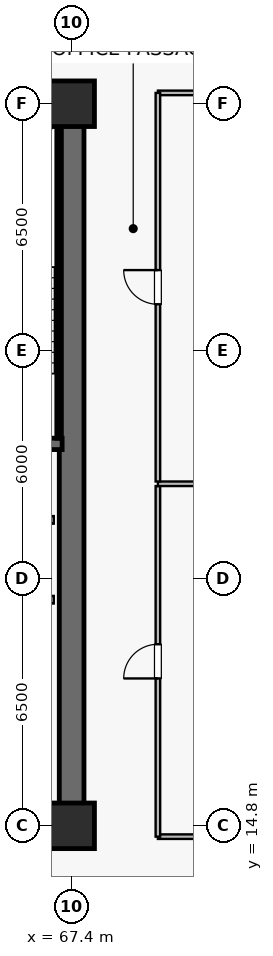
"""IFC4 building model, lengths in metres.
Left out: names, types, materials, properties, quantities, classifications, styles, units other than length and angle.
Written with IfcOpenShell. Run it as: python <this file> out.ifc"""

import sys

from ifc_helpers import new_model, si_unit, direction, frame, frame_2d, origin, origin_2d, place, context, subcontext, project, spatial, rectangle, extrude, source, transform, mapped, element, fill, save


model = new_model("IFC4")
c1 = context("Model", 3, precision=1e-05, world=origin(), true_north=direction((0.0, 1.0)))
c2 = subcontext(c1, "Body", "Model", "MODEL_VIEW")
j1 = project(units=[si_unit("LENGTHUNIT", "METRE"), si_unit("PLANEANGLEUNIT", "RADIAN")], contexts=[c1])
p1 = place(None, origin())
s1 = spatial("IfcSite", under=j1, at=p1, CompositionType="ELEMENT")
p2 = place(p1, origin())
s2 = spatial("IfcBuilding", under=s1, at=p2, CompositionType="ELEMENT")
p3 = place(p2, frame((0.0, 0.0, 133.8)))
s3 = spatial("IfcBuildingStorey", under=s2, at=p3, CompositionType="ELEMENT", Elevation=133.8)
p4 = place(p3, frame((52.275, 14.8, 0.0), z_axis=(0.0, 0.0, 1.0), x_axis=(1.0, 0.0, 0.0)))
e1 = element("IfcWall", 1, at=p4, inside=s3, PredefinedType="SHEAR", context=c2, shape_type="SweptSolid", body=[
    extrude(rectangle(XDim=15.45, YDim=0.65, at=frame_2d((7.725, 0.0))), origin(), (0.0, 0.0, 1.0), 3.79),
])
p5 = place(p3, frame((52.275, 33.8, 0.0), z_axis=(0.0, 0.0, 1.0), x_axis=(1.0, 0.0, 0.0)))
e2 = element("IfcWall", 2, at=p5, inside=s3, PredefinedType="SHEAR", context=c2, shape_type="SweptSolid", body=[
    extrude(rectangle(XDim=15.45, YDim=0.65, at=frame_2d((7.725, 0.0))), origin(), (0.0, 0.0, 1.0), 3.79),
])
p6 = place(p5, frame((8.825, 0.0, 0.0)))
e3 = element("IfcOpeningElement", 3, at=p6, cuts=e2, PredefinedType="OPENING", context=c2, shape_type="SweptSolid", body=[
    extrude(rectangle(XDim=0.95, YDim=2.15, at=frame_2d((0.475, 1.075))), frame((0.0, 0.335, 0.0), z_axis=(0.0, -1.0, 0.0), x_axis=(1.0, 0.0, 0.0)), (0.0, 0.0, 1.0), 0.67),
])
p7 = place(p5, frame((5.46, 0.0, 0.0)))
e4 = element("IfcOpeningElement", 4, at=p7, cuts=e2, PredefinedType="OPENING", context=c2, shape_type="SweptSolid", body=[
    extrude(rectangle(XDim=0.95, YDim=2.15, at=frame_2d((0.475, 1.075))), frame((0.0, 0.335, 0.0), z_axis=(0.0, -1.0, 0.0), x_axis=(1.0, 0.0, 0.0)), (0.0, 0.0, 1.0), 0.67),
])
p8 = place(p5, frame((2.06, 0.0, 0.0)))
e5 = element("IfcOpeningElement", 5, at=p8, cuts=e2, PredefinedType="OPENING", context=c2, shape_type="SweptSolid", body=[
    extrude(rectangle(XDim=0.95, YDim=2.15, at=frame_2d((0.475, 1.075))), frame((0.0, 0.335, 0.0), z_axis=(0.0, -1.0, 0.0), x_axis=(1.0, 0.0, 0.0)), (0.0, 0.0, 1.0), 0.67),
])
p9 = place(p3, frame((67.4, 15.125, 0.0), z_axis=(0.0, 0.0, 1.0), x_axis=(0.0, 1.0, 0.0)))
e6 = element("IfcWall", 6, at=p9, inside=s3, PredefinedType="SHEAR", context=c2, shape_type="SweptSolid", body=[
    extrude(rectangle(XDim=18.35, YDim=0.65, at=frame_2d((9.175, 0.0))), origin(), (0.0, 0.0, 1.0), 3.79),
])
p10 = place(p3, frame((63.35, 24.85, 0.0), z_axis=(0.0, 0.0, 1.0), x_axis=(1.0, 0.0, 0.0)))
e7 = element("IfcWall", 7, at=p10, inside=s3, PredefinedType="SHEAR", context=c2, shape_type="SweptSolid", body=[
    extrude(rectangle(XDim=3.8, YDim=0.3, at=frame_2d((1.9, 0.0))), origin(), (0.0, 0.0, 1.0), 3.79),
])
p11 = place(p3, frame((63.35, 33.4, 0.0), z_axis=(0.0, 0.0, 1.0), x_axis=(1.0, 0.0, 0.0)))
e8 = element("IfcWall", 8, at=p11, inside=s3, PredefinedType="SOLIDWALL", context=c2, shape_type="SweptSolid", body=[
    extrude(rectangle(XDim=3.72, YDim=0.12, at=frame_2d((1.86, 0.0))), origin(), (0.0, 0.0, 1.0), 3.79),
])
p12 = place(p3, frame((67.07, 25.0, 0.0), z_axis=(0.0, 0.0, 1.0), x_axis=(0.0, 1.0, 0.0)))
e9 = element("IfcWall", 9, at=p12, inside=s3, PredefinedType="SOLIDWALL", context=c2, shape_type="SweptSolid", body=[
    extrude(rectangle(XDim=8.32, YDim=0.12, at=frame_2d((4.16, 0.0))), origin(), (0.0, 0.0, 1.0), 3.79),
])
m1 = source(origin(), c2, "Body", "SweptSolid", [
    extrude(rectangle(XDim=1.2, YDim=1.2, at=origin_2d()), origin(), (0.0, 0.0, 1.0), 4.1),
])
for number, where, z_axis, x_axis in (
    (10, (67.4, 14.8, 0.0), (0.0, 0.0, 1.0), (1.0, 0.0, 0.0)),
    (11, (67.4, 33.8, 0.0), (0.0, 0.0, 1.0), (1.0, 0.0, 0.0)),
):
    element("IfcColumn", number, at=place(p3, frame(where, z_axis=z_axis, x_axis=x_axis)), inside=s3, PredefinedType="COLUMN", context=c2, shape_type="MappedRepresentation", body=[
        mapped(m1, transform((0.0, 0.0, 0.0), scale=1.0)),
    ])
for number, where, z_axis, x_axis in (
    (12, (64.67, 20.75, 0.0), (0.0, 0.0, 1.0), (1.0, 0.0, 0.0)),
    (13, (64.67, 22.85, 0.0), (0.0, 0.0, 1.0), (1.0, 0.0, 0.0)),
):
    element("IfcWall", number, at=place(p3, frame(where, z_axis=z_axis, x_axis=x_axis)), inside=s3, PredefinedType="SOLIDWALL", context=c2, shape_type="SweptSolid", body=[
        extrude(rectangle(XDim=2.26, YDim=0.2, at=frame_2d((1.13, 0.0))), origin(), (0.0, 0.0, 1.0), 3.79),
    ])
for number, where, z_axis, x_axis in (
    (14, (69.67, 14.515, 0.0), (0.0, 0.0, 1.0), (1.0, 0.0, 0.0)),
    (15, (69.67, 34.085, 0.0), (0.0, 0.0, 1.0), (1.0, 0.0, 0.0)),
):
    element("IfcWall", number, at=place(p3, frame(where, z_axis=z_axis, x_axis=x_axis)), inside=s3, PredefinedType="PARTITIONING", context=c2, shape_type="SweptSolid", body=[
        extrude(rectangle(XDim=3.02, YDim=0.12, at=frame_2d((1.51, 0.0))), origin(), (0.0, 0.0, 1.0), 3.79),
    ])
p13 = place(p3, frame((69.67, 14.515, 0.0), z_axis=(0.0, 0.0, 1.0), x_axis=(0.0, 1.0, 0.0)))
e16 = element("IfcWall", 16, at=p13, inside=s3, PredefinedType="PARTITIONING", context=c2, shape_type="SweptSolid", body=[
    extrude(rectangle(XDim=9.225, YDim=0.12, at=frame_2d((4.613, 0.0))), origin(), (0.0, 0.0, 1.0), 3.79),
])
p14 = place(p13, frame((4.163, 0.0, 0.0)))
e17 = element("IfcOpeningElement", 17, at=p14, cuts=e16, PredefinedType="OPENING", context=c2, shape_type="SweptSolid", body=[
    extrude(rectangle(XDim=0.9, YDim=2.1, at=frame_2d((0.45, 1.05))), frame((0.0, 0.07, 0.0), z_axis=(0.0, -1.0, 0.0), x_axis=(1.0, 0.0, 0.0)), (0.0, 0.0, 1.0), 0.14),
])
p15 = place(p3, frame((69.67, 23.8, 0.0), z_axis=(0.0, 0.0, 1.0), x_axis=(1.0, 0.0, 0.0)))
e18 = element("IfcWall", 18, at=p15, inside=s3, PredefinedType="PARTITIONING", context=c2, shape_type="SweptSolid", body=[
    extrude(rectangle(XDim=3.02, YDim=0.12, at=frame_2d((1.51, 0.0))), origin(), (0.0, 0.0, 1.0), 3.79),
])
p16 = place(p3, frame((69.67, 23.86, 0.0), z_axis=(0.0, 0.0, 1.0), x_axis=(0.0, 1.0, 0.0)))
e19 = element("IfcWall", 19, at=p16, inside=s3, PredefinedType="PARTITIONING", context=c2, shape_type="SweptSolid", body=[
    extrude(rectangle(XDim=10.225, YDim=0.12, at=frame_2d((5.112, 0.0))), origin(), (0.0, 0.0, 1.0), 3.79),
])
p17 = place(p16, frame((4.663, 0.0, 0.0)))
e20 = element("IfcOpeningElement", 20, at=p17, cuts=e19, PredefinedType="OPENING", context=c2, shape_type="SweptSolid", body=[
    extrude(rectangle(XDim=0.9, YDim=2.1, at=frame_2d((0.45, 1.05))), frame((0.0, 0.07, 0.0), z_axis=(0.0, -1.0, 0.0), x_axis=(1.0, 0.0, 0.0)), (0.0, 0.0, 1.0), 0.14),
])
m2 = source(origin(), c2, "Body", "SweptSolid", [
    extrude(rectangle(XDim=0.9, YDim=2.1, at=frame_2d((0.45, 1.05))), frame((0.0, 0.025, 0.0), z_axis=(0.0, -1.0, 0.0), x_axis=(1.0, 0.0, 0.0)), (0.0, 0.0, 1.0), 0.05),
])
p18 = place(p14, origin())
e21 = element("IfcDoor", 21, at=p18, inside=s3, OperationType="SINGLE_SWING_LEFT", PredefinedType="DOOR", context=c2, shape_type="MappedRepresentation", body=[
    mapped(m2, transform((0.0, 0.0, 0.0), scale=1.0)),
])
fill(e17, e21)
p19 = place(p17, origin())
e22 = element("IfcDoor", 22, at=p19, inside=s3, OperationType="SINGLE_SWING_RIGHT", PredefinedType="DOOR", context=c2, shape_type="MappedRepresentation", body=[
    mapped(m2, transform((0.0, 0.0, 0.0), scale=1.0)),
])
fill(e20, e22)
save(model, sys.argv[1])
